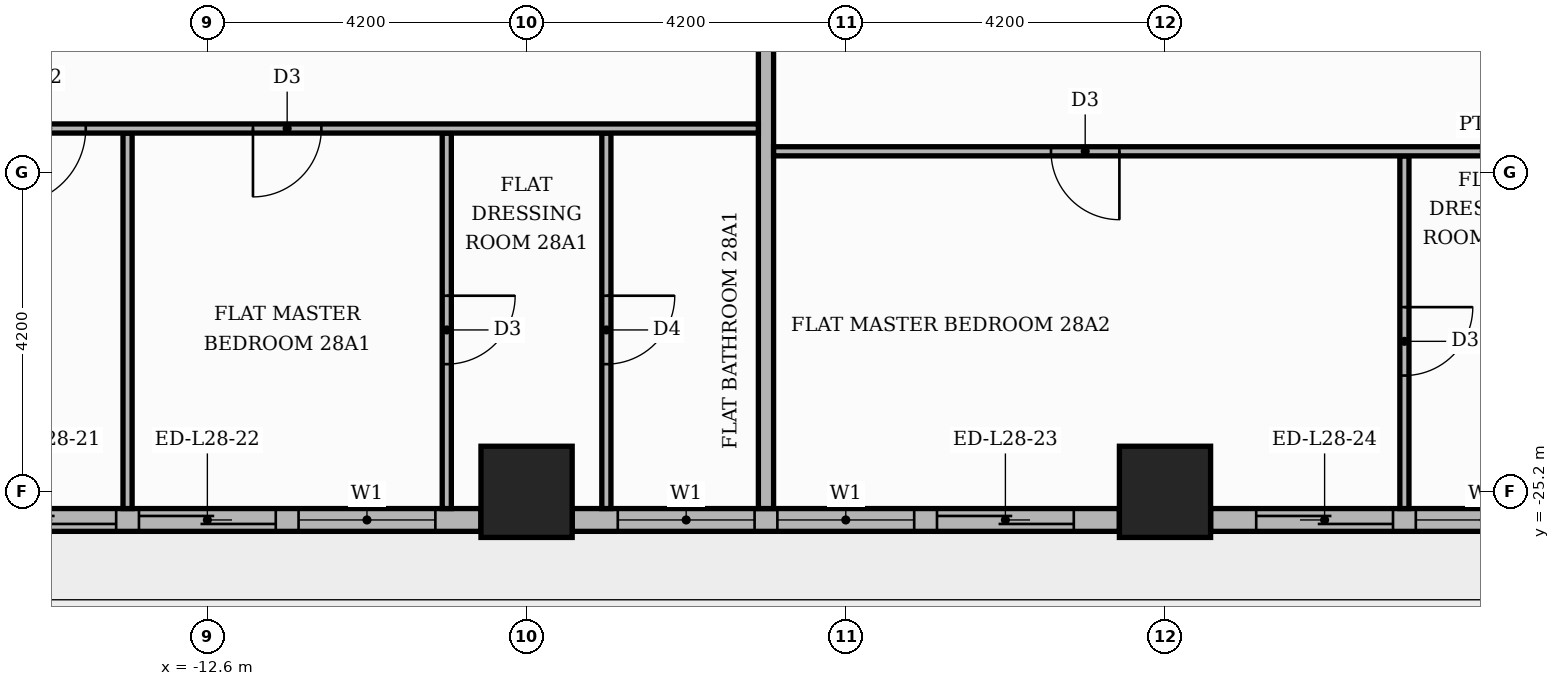
"""IFC4 building model, lengths in metres.
Left out: names, types, materials, properties, quantities, classifications, styles, units other than length and angle.
Written with IfcOpenShell. Run it as: python <this file> out.ifc"""

import sys

from ifc_helpers import new_model, si_unit, direction, frame, frame_2d, origin, origin_2d, place, context, subcontext, project, spatial, rectangle, extrude, element, fill, save


model = new_model("IFC4")
c1 = context("Model", 3, precision=1e-05, world=origin(), true_north=direction((0.0, 1.0)))
c2 = subcontext(c1, "Body", "Model", "MODEL_VIEW")
j1 = project(units=[si_unit("LENGTHUNIT", "METRE"), si_unit("PLANEANGLEUNIT", "RADIAN")], contexts=[c1])
p1 = place(None, origin())
s1 = spatial("IfcSite", under=j1, at=p1, CompositionType="ELEMENT")
p2 = place(p1, origin())
s2 = spatial("IfcBuilding", under=s1, at=p2, CompositionType="ELEMENT")
p3 = place(p2, frame((0.0, 0.0, 118.2)))
s3 = spatial("IfcBuildingStorey", under=s2, at=p3, CompositionType="ELEMENT", Elevation=118.2)
for number, where, z_axis, x_axis in (
    (1, (0.0, -25.2, 0.0), (0.0, 0.0, 1.0), (1.0, 0.0, 0.0)),
    (2, (-8.4, -25.2, 0.0), (0.0, 0.0, 1.0), (1.0, 0.0, 0.0)),
):
    element("IfcColumn", number, at=place(p3, frame(where, z_axis=z_axis, x_axis=x_axis)), inside=s3, PredefinedType="COLUMN", context=c2, shape_type="SweptSolid", body=[
        extrude(rectangle(XDim=1.2, YDim=1.2, at=origin_2d()), origin(), (0.0, 0.0, 1.0), 3.9),
    ])
p4 = place(p3, frame((-16.2, -25.57, 0.0), z_axis=(0.0, 0.0, 1.0), x_axis=(1.0, 0.0, 0.0)))
e3 = element("IfcWall", 3, at=p4, inside=s3, PredefinedType="STANDARD", context=c2, shape_type="SweptSolid", body=[
    extrude(rectangle(XDim=7.2, YDim=0.3, at=frame_2d((3.6, 0.0))), origin(), (0.0, 0.0, 1.0), 3.48),
])
p5 = place(p4, frame((0.6, 0.0, 0.0)))
e4 = element("IfcOpeningElement", 4, at=p5, cuts=e3, PredefinedType="OPENING", context=c2, shape_type="SweptSolid", body=[
    extrude(rectangle(XDim=1.8, YDim=2.4, at=frame_2d((0.9, 1.2))), frame((0.0, 0.16, 0.0), z_axis=(0.0, -1.0, 0.0), x_axis=(1.0, 0.0, 0.0)), (0.0, 0.0, 1.0), 0.32),
])
p6 = place(p4, frame((2.7, 0.0, 0.0)))
e5 = element("IfcOpeningElement", 5, at=p6, cuts=e3, PredefinedType="OPENING", context=c2, shape_type="SweptSolid", body=[
    extrude(rectangle(XDim=1.8, YDim=2.4, at=frame_2d((0.9, 1.2))), frame((0.0, 0.16, 0.0), z_axis=(0.0, -1.0, 0.0), x_axis=(1.0, 0.0, 0.0)), (0.0, 0.0, 1.0), 0.32),
])
p7 = place(p4, frame((4.8, 0.0, 0.9)))
e6 = element("IfcOpeningElement", 6, at=p7, cuts=e3, PredefinedType="OPENING", context=c2, shape_type="SweptSolid", body=[
    extrude(rectangle(XDim=1.8, YDim=2.1, at=frame_2d((0.9, 1.05))), frame((0.0, 0.16, 0.0), z_axis=(0.0, -1.0, 0.0), x_axis=(1.0, 0.0, 0.0)), (0.0, 0.0, 1.0), 0.32),
])
p8 = place(p3, frame((-7.8, -25.57, 0.0), z_axis=(0.0, 0.0, 1.0), x_axis=(1.0, 0.0, 0.0)))
e7 = element("IfcWall", 7, at=p8, inside=s3, PredefinedType="STANDARD", context=c2, shape_type="SweptSolid", body=[
    extrude(rectangle(XDim=7.2, YDim=0.3, at=frame_2d((3.6, 0.0))), origin(), (0.0, 0.0, 1.0), 3.48),
])
p9 = place(p8, frame((0.6, 0.0, 0.9)))
e8 = element("IfcOpeningElement", 8, at=p9, cuts=e7, PredefinedType="OPENING", context=c2, shape_type="SweptSolid", body=[
    extrude(rectangle(XDim=1.8, YDim=2.1, at=frame_2d((0.9, 1.05))), frame((0.0, 0.16, 0.0), z_axis=(0.0, -1.0, 0.0), x_axis=(1.0, 0.0, 0.0)), (0.0, 0.0, 1.0), 0.32),
])
p10 = place(p8, frame((2.7, 0.0, 0.9)))
e9 = element("IfcOpeningElement", 9, at=p10, cuts=e7, PredefinedType="OPENING", context=c2, shape_type="SweptSolid", body=[
    extrude(rectangle(XDim=1.8, YDim=2.1, at=frame_2d((0.9, 1.05))), frame((0.0, 0.16, 0.0), z_axis=(0.0, -1.0, 0.0), x_axis=(1.0, 0.0, 0.0)), (0.0, 0.0, 1.0), 0.32),
])
p11 = place(p8, frame((4.8, 0.0, 0.0)))
e10 = element("IfcOpeningElement", 10, at=p11, cuts=e7, PredefinedType="OPENING", context=c2, shape_type="SweptSolid", body=[
    extrude(rectangle(XDim=1.8, YDim=2.4, at=frame_2d((0.9, 1.2))), frame((0.0, 0.16, 0.0), z_axis=(0.0, -1.0, 0.0), x_axis=(1.0, 0.0, 0.0)), (0.0, 0.0, 1.0), 0.32),
])
p12 = place(p3, frame((0.6, -25.57, 0.0), z_axis=(0.0, 0.0, 1.0), x_axis=(1.0, 0.0, 0.0)))
e11 = element("IfcWall", 11, at=p12, inside=s3, PredefinedType="STANDARD", context=c2, shape_type="SweptSolid", body=[
    extrude(rectangle(XDim=7.2, YDim=0.3, at=frame_2d((3.6, 0.0))), origin(), (0.0, 0.0, 1.0), 3.48),
])
p13 = place(p12, frame((0.6, 0.0, 0.0)))
e12 = element("IfcOpeningElement", 12, at=p13, cuts=e11, PredefinedType="OPENING", context=c2, shape_type="SweptSolid", body=[
    extrude(rectangle(XDim=1.8, YDim=2.4, at=frame_2d((0.9, 1.2))), frame((0.0, 0.16, 0.0), z_axis=(0.0, -1.0, 0.0), x_axis=(1.0, 0.0, 0.0)), (0.0, 0.0, 1.0), 0.32),
])
p14 = place(p12, frame((2.7, 0.0, 0.9)))
e13 = element("IfcOpeningElement", 13, at=p14, cuts=e11, PredefinedType="OPENING", context=c2, shape_type="SweptSolid", body=[
    extrude(rectangle(XDim=1.8, YDim=2.1, at=frame_2d((0.9, 1.05))), frame((0.0, 0.16, 0.0), z_axis=(0.0, -1.0, 0.0), x_axis=(1.0, 0.0, 0.0)), (0.0, 0.0, 1.0), 0.32),
])
p15 = place(p12, frame((4.8, 0.0, 0.9)))
e14 = element("IfcOpeningElement", 14, at=p15, cuts=e11, PredefinedType="OPENING", context=c2, shape_type="SweptSolid", body=[
    extrude(rectangle(XDim=1.8, YDim=2.1, at=frame_2d((0.9, 1.05))), frame((0.0, 0.16, 0.0), z_axis=(0.0, -1.0, 0.0), x_axis=(1.0, 0.0, 0.0)), (0.0, 0.0, 1.0), 0.32),
])
p16 = place(p3, frame((-13.65, -25.42, 0.0), z_axis=(0.0, 0.0, 1.0), x_axis=(0.0, 1.0, 0.0)))
e15 = element("IfcWall", 15, at=p16, inside=s3, PredefinedType="PARTITIONING", context=c2, shape_type="SweptSolid", body=[
    extrude(rectangle(XDim=4.94, YDim=0.12, at=frame_2d((2.47, 0.0))), origin(), (0.0, 0.0, 1.0), 3.48),
])
p17 = place(p3, frame((-9.45, -25.42, 0.0), z_axis=(0.0, 0.0, 1.0), x_axis=(0.0, 1.0, 0.0)))
e16 = element("IfcWall", 16, at=p17, inside=s3, PredefinedType="PARTITIONING", context=c2, shape_type="SweptSolid", body=[
    extrude(rectangle(XDim=4.94, YDim=0.12, at=frame_2d((2.47, 0.0))), origin(), (0.0, 0.0, 1.0), 3.48),
])
p18 = place(p17, frame((1.9, 0.0, 0.0)))
e17 = element("IfcOpeningElement", 17, at=p18, cuts=e16, PredefinedType="OPENING", context=c2, shape_type="SweptSolid", body=[
    extrude(rectangle(XDim=0.9, YDim=2.1, at=frame_2d((0.45, 1.05))), frame((0.0, 0.07, 0.0), z_axis=(0.0, -1.0, 0.0), x_axis=(1.0, 0.0, 0.0)), (0.0, 0.0, 1.0), 0.14),
])
p19 = place(p3, frame((-7.35, -25.42, 0.0), z_axis=(0.0, 0.0, 1.0), x_axis=(0.0, 1.0, 0.0)))
e18 = element("IfcWall", 18, at=p19, inside=s3, PredefinedType="PARTITIONING", context=c2, shape_type="SweptSolid", body=[
    extrude(rectangle(XDim=4.94, YDim=0.12, at=frame_2d((2.47, 0.0))), origin(), (0.0, 0.0, 1.0), 3.48),
])
p20 = place(p19, frame((1.9, 0.0, 0.0)))
e19 = element("IfcOpeningElement", 19, at=p20, cuts=e18, PredefinedType="OPENING", context=c2, shape_type="SweptSolid", body=[
    extrude(rectangle(XDim=0.9, YDim=2.1, at=frame_2d((0.45, 1.05))), frame((0.0, 0.07, 0.0), z_axis=(0.0, -1.0, 0.0), x_axis=(1.0, 0.0, 0.0)), (0.0, 0.0, 1.0), 0.14),
])
p21 = place(p3, frame((-5.25, -25.42, 0.0), z_axis=(0.0, 0.0, 1.0), x_axis=(0.0, 1.0, 0.0)))
e20 = element("IfcWall", 20, at=p21, inside=s3, PredefinedType="PARTITIONING", context=c2, shape_type="SweptSolid", body=[
    extrude(rectangle(XDim=11.67, YDim=0.2, at=frame_2d((5.835, 0.0))), origin(), (0.0, 0.0, 1.0), 3.48),
])
p22 = place(p3, frame((3.15, -25.42, 0.0), z_axis=(0.0, 0.0, 1.0), x_axis=(0.0, 1.0, 0.0)))
e21 = element("IfcWall", 21, at=p22, inside=s3, PredefinedType="PARTITIONING", context=c2, shape_type="SweptSolid", body=[
    extrude(rectangle(XDim=4.64, YDim=0.12, at=frame_2d((2.32, 0.0))), origin(), (0.0, 0.0, 1.0), 3.48),
])
p23 = place(p22, frame((1.75, 0.0, 0.0)))
e22 = element("IfcOpeningElement", 22, at=p23, cuts=e21, PredefinedType="OPENING", context=c2, shape_type="SweptSolid", body=[
    extrude(rectangle(XDim=0.9, YDim=2.1, at=frame_2d((0.45, 1.05))), frame((0.0, 0.07, 0.0), z_axis=(0.0, -1.0, 0.0), x_axis=(1.0, 0.0, 0.0)), (0.0, 0.0, 1.0), 0.14),
])
p24 = place(p3, frame((-5.15, -20.72, 0.0), z_axis=(0.0, 0.0, 1.0), x_axis=(1.0, 0.0, 0.0)))
e23 = element("IfcWall", 23, at=p24, inside=s3, PredefinedType="PARTITIONING", context=c2, shape_type="SweptSolid", body=[
    extrude(rectangle(XDim=18.7, YDim=0.12, at=frame_2d((9.35, 0.0))), origin(), (0.0, 0.0, 1.0), 3.48),
])
p25 = place(p24, frame((3.65, 0.0, 0.0)))
e24 = element("IfcOpeningElement", 24, at=p25, cuts=e23, PredefinedType="OPENING", context=c2, shape_type="SweptSolid", body=[
    extrude(rectangle(XDim=0.9, YDim=2.1, at=frame_2d((0.45, 1.05))), frame((0.0, 0.07, 0.0), z_axis=(0.0, -1.0, 0.0), x_axis=(1.0, 0.0, 0.0)), (0.0, 0.0, 1.0), 0.14),
])
p26 = place(p24, frame((15.15, 0.0, 0.0)))
e25 = element("IfcOpeningElement", 25, at=p26, cuts=e23, PredefinedType="OPENING", context=c2, shape_type="SweptSolid", body=[
    extrude(rectangle(XDim=1.0, YDim=2.1, at=frame_2d((0.5, 1.05))), frame((0.0, 0.07, 0.0), z_axis=(0.0, -1.0, 0.0), x_axis=(1.0, 0.0, 0.0)), (0.0, 0.0, 1.0), 0.14),
])
p27 = place(p3, frame((-25.42, -20.42, 0.0), z_axis=(0.0, 0.0, 1.0), x_axis=(1.0, 0.0, 0.0)))
e26 = element("IfcWall", 26, at=p27, inside=s3, PredefinedType="PARTITIONING", context=c2, shape_type="SweptSolid", body=[
    extrude(rectangle(XDim=20.07, YDim=0.12, at=frame_2d((10.035, 0.0))), origin(), (0.0, 0.0, 1.0), 3.48),
])
p28 = place(p27, frame((10.22, 0.0, 0.0)))
e27 = element("IfcOpeningElement", 27, at=p28, cuts=e26, PredefinedType="OPENING", context=c2, shape_type="SweptSolid", body=[
    extrude(rectangle(XDim=1.0, YDim=2.1, at=frame_2d((0.5, 1.05))), frame((0.0, 0.07, 0.0), z_axis=(0.0, -1.0, 0.0), x_axis=(1.0, 0.0, 0.0)), (0.0, 0.0, 1.0), 0.14),
])
p29 = place(p27, frame((13.42, 0.0, 0.0)))
e28 = element("IfcOpeningElement", 28, at=p29, cuts=e26, PredefinedType="OPENING", context=c2, shape_type="SweptSolid", body=[
    extrude(rectangle(XDim=0.9, YDim=2.1, at=frame_2d((0.45, 1.05))), frame((0.0, 0.07, 0.0), z_axis=(0.0, -1.0, 0.0), x_axis=(1.0, 0.0, 0.0)), (0.0, 0.0, 1.0), 0.14),
])
p30 = place(p5, origin())
e29 = element("IfcDoor", 29, at=p30, inside=s3, OperationType="SLIDING_TO_LEFT", PredefinedType="DOOR", context=c2, shape_type="SweptSolid", body=[
    extrude(rectangle(XDim=1.8, YDim=2.4, at=frame_2d((0.9, 1.2))), frame((0.0, 0.025, 0.0), z_axis=(0.0, -1.0, 0.0), x_axis=(1.0, 0.0, 0.0)), (0.0, 0.0, 1.0), 0.05),
])
fill(e4, e29)
p31 = place(p6, origin())
e30 = element("IfcDoor", 30, at=p31, inside=s3, OperationType="SLIDING_TO_RIGHT", PredefinedType="DOOR", context=c2, shape_type="SweptSolid", body=[
    extrude(rectangle(XDim=1.8, YDim=2.4, at=frame_2d((0.9, 1.2))), frame((0.0, 0.025, 0.0), z_axis=(0.0, -1.0, 0.0), x_axis=(1.0, 0.0, 0.0)), (0.0, 0.0, 1.0), 0.05),
])
fill(e5, e30)
p32 = place(p7, origin())
e31 = element("IfcWindow", 31, at=p32, inside=s3, PartitioningType="SINGLE_PANEL", PredefinedType="WINDOW", context=c2, shape_type="SweptSolid", body=[
    extrude(rectangle(XDim=1.8, YDim=2.1, at=frame_2d((0.9, 1.05))), frame((0.0, 0.03, 0.0), z_axis=(0.0, -1.0, 0.0), x_axis=(1.0, 0.0, 0.0)), (0.0, 0.0, 1.0), 0.06),
])
fill(e6, e31)
p33 = place(p9, origin())
e32 = element("IfcWindow", 32, at=p33, inside=s3, PartitioningType="SINGLE_PANEL", PredefinedType="WINDOW", context=c2, shape_type="SweptSolid", body=[
    extrude(rectangle(XDim=1.8, YDim=2.1, at=frame_2d((0.9, 1.05))), frame((0.0, 0.03, 0.0), z_axis=(0.0, -1.0, 0.0), x_axis=(1.0, 0.0, 0.0)), (0.0, 0.0, 1.0), 0.06),
])
fill(e8, e32)
p34 = place(p10, origin())
e33 = element("IfcWindow", 33, at=p34, inside=s3, PartitioningType="SINGLE_PANEL", PredefinedType="WINDOW", context=c2, shape_type="SweptSolid", body=[
    extrude(rectangle(XDim=1.8, YDim=2.1, at=frame_2d((0.9, 1.05))), frame((0.0, 0.03, 0.0), z_axis=(0.0, -1.0, 0.0), x_axis=(1.0, 0.0, 0.0)), (0.0, 0.0, 1.0), 0.06),
])
fill(e9, e33)
p35 = place(p11, origin())
e34 = element("IfcDoor", 34, at=p35, inside=s3, OperationType="SLIDING_TO_RIGHT", PredefinedType="DOOR", context=c2, shape_type="SweptSolid", body=[
    extrude(rectangle(XDim=1.8, YDim=2.4, at=frame_2d((0.9, 1.2))), frame((0.0, 0.025, 0.0), z_axis=(0.0, -1.0, 0.0), x_axis=(1.0, 0.0, 0.0)), (0.0, 0.0, 1.0), 0.05),
])
fill(e10, e34)
p36 = place(p13, origin())
e35 = element("IfcDoor", 35, at=p36, inside=s3, OperationType="SLIDING_TO_LEFT", PredefinedType="DOOR", context=c2, shape_type="SweptSolid", body=[
    extrude(rectangle(XDim=1.8, YDim=2.4, at=frame_2d((0.9, 1.2))), frame((0.0, 0.025, 0.0), z_axis=(0.0, -1.0, 0.0), x_axis=(1.0, 0.0, 0.0)), (0.0, 0.0, 1.0), 0.05),
])
fill(e12, e35)
p37 = place(p14, origin())
e36 = element("IfcWindow", 36, at=p37, inside=s3, PartitioningType="SINGLE_PANEL", PredefinedType="WINDOW", context=c2, shape_type="SweptSolid", body=[
    extrude(rectangle(XDim=1.8, YDim=2.1, at=frame_2d((0.9, 1.05))), frame((0.0, 0.03, 0.0), z_axis=(0.0, -1.0, 0.0), x_axis=(1.0, 0.0, 0.0)), (0.0, 0.0, 1.0), 0.06),
])
fill(e13, e36)
p38 = place(p28, frame((1.0, 0.0, 0.0), z_axis=(0.0, 0.0, 1.0), x_axis=(-1.0, 0.0, 0.0)))
e37 = element("IfcDoor", 37, at=p38, inside=s3, OperationType="SINGLE_SWING_LEFT", PredefinedType="DOOR", context=c2, shape_type="SweptSolid", body=[
    extrude(rectangle(XDim=1.0, YDim=2.1, at=frame_2d((0.5, 1.05))), frame((0.0, 0.025, 0.0), z_axis=(0.0, -1.0, 0.0), x_axis=(1.0, 0.0, 0.0)), (0.0, 0.0, 1.0), 0.05),
])
fill(e27, e37)
p39 = place(p29, frame((0.9, 0.0, 0.0), z_axis=(0.0, 0.0, 1.0), x_axis=(-1.0, 0.0, 0.0)))
e38 = element("IfcDoor", 38, at=p39, inside=s3, OperationType="SINGLE_SWING_LEFT", PredefinedType="DOOR", context=c2, shape_type="SweptSolid", body=[
    extrude(rectangle(XDim=0.9, YDim=2.1, at=frame_2d((0.45, 1.05))), frame((0.0, 0.025, 0.0), z_axis=(0.0, -1.0, 0.0), x_axis=(1.0, 0.0, 0.0)), (0.0, 0.0, 1.0), 0.05),
])
fill(e28, e38)
p40 = place(p18, frame((0.9, 0.0, 0.0), z_axis=(0.0, 0.0, 1.0), x_axis=(-1.0, 0.0, 0.0)))
e39 = element("IfcDoor", 39, at=p40, inside=s3, OperationType="SINGLE_SWING_RIGHT", PredefinedType="DOOR", context=c2, shape_type="SweptSolid", body=[
    extrude(rectangle(XDim=0.9, YDim=2.1, at=frame_2d((0.45, 1.05))), frame((0.0, 0.025, 0.0), z_axis=(0.0, -1.0, 0.0), x_axis=(1.0, 0.0, 0.0)), (0.0, 0.0, 1.0), 0.05),
])
fill(e17, e39)
p41 = place(p20, frame((0.9, 0.0, 0.0), z_axis=(0.0, 0.0, 1.0), x_axis=(-1.0, 0.0, 0.0)))
e40 = element("IfcDoor", 40, at=p41, inside=s3, OperationType="SINGLE_SWING_RIGHT", PredefinedType="DOOR", context=c2, shape_type="SweptSolid", body=[
    extrude(rectangle(XDim=0.9, YDim=2.1, at=frame_2d((0.45, 1.05))), frame((0.0, 0.025, 0.0), z_axis=(0.0, -1.0, 0.0), x_axis=(1.0, 0.0, 0.0)), (0.0, 0.0, 1.0), 0.05),
])
fill(e19, e40)
p42 = place(p25, frame((0.9, 0.0, 0.0), z_axis=(0.0, 0.0, 1.0), x_axis=(-1.0, 0.0, 0.0)))
e41 = element("IfcDoor", 41, at=p42, inside=s3, OperationType="SINGLE_SWING_RIGHT", PredefinedType="DOOR", context=c2, shape_type="SweptSolid", body=[
    extrude(rectangle(XDim=0.9, YDim=2.1, at=frame_2d((0.45, 1.05))), frame((0.0, 0.025, 0.0), z_axis=(0.0, -1.0, 0.0), x_axis=(1.0, 0.0, 0.0)), (0.0, 0.0, 1.0), 0.05),
])
fill(e24, e41)
p43 = place(p23, frame((0.9, 0.0, 0.0), z_axis=(0.0, 0.0, 1.0), x_axis=(-1.0, 0.0, 0.0)))
e42 = element("IfcDoor", 42, at=p43, inside=s3, OperationType="SINGLE_SWING_RIGHT", PredefinedType="DOOR", context=c2, shape_type="SweptSolid", body=[
    extrude(rectangle(XDim=0.9, YDim=2.1, at=frame_2d((0.45, 1.05))), frame((0.0, 0.025, 0.0), z_axis=(0.0, -1.0, 0.0), x_axis=(1.0, 0.0, 0.0)), (0.0, 0.0, 1.0), 0.05),
])
fill(e22, e42)
save(model, sys.argv[1])
